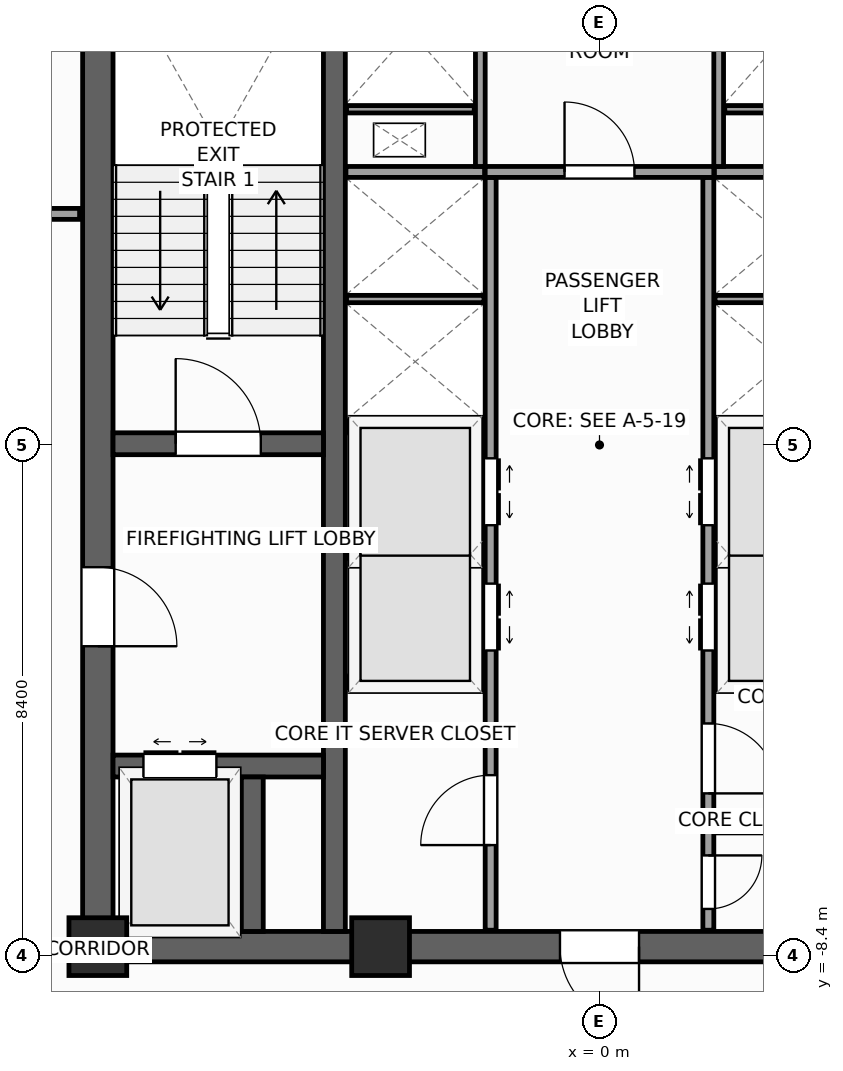
"""IFC4 building model, lengths in metres.
Left out: names, types, materials, properties, quantities, classifications, styles, units other than length and angle.
Written with IfcOpenShell. Run it as: python <this file> out.ifc"""

import sys

from ifc_helpers import new_model, si_unit, direction, frame, frame_2d, origin, origin_2d, place, context, subcontext, project, spatial, rectangle, extrude, source, transform, mapped, element, fill, save


model = new_model("IFC4")
c1 = context("Model", 3, precision=1e-05, world=origin(), true_north=direction((0.0, 1.0)))
c2 = subcontext(c1, "Body", "Model", "MODEL_VIEW")
j1 = project(units=[si_unit("LENGTHUNIT", "METRE"), si_unit("PLANEANGLEUNIT", "RADIAN")], contexts=[c1])
p1 = place(None, origin())
s1 = spatial("IfcSite", under=j1, at=p1, CompositionType="ELEMENT")
p2 = place(p1, origin())
s2 = spatial("IfcBuilding", under=s1, at=p2, CompositionType="ELEMENT")
p3 = place(p2, frame((0.0, 0.0, 217.3)))
s3 = spatial("IfcBuildingStorey", under=s2, at=p3, CompositionType="ELEMENT", Elevation=217.3)
p4 = place(p3, frame((-8.5, -8.25, 0.0), z_axis=(0.0, 0.0, 1.0), x_axis=(1.0, 0.0, 0.0)))
e1 = element("IfcWall", 1, at=p4, inside=s3, PredefinedType="SHEAR", context=c2, shape_type="SweptSolid", body=[
    extrude(rectangle(XDim=17.0, YDim=0.5, at=frame_2d((8.5, 0.0))), origin(), (0.0, 0.0, 1.0), 3.9),
])
p5 = place(p4, frame((7.85, 0.0, 0.0)))
e2 = element("IfcOpeningElement", 2, at=p5, cuts=e1, PredefinedType="OPENING", context=c2, shape_type="SweptSolid", body=[
    extrude(rectangle(XDim=1.3, YDim=2.2, at=frame_2d((0.65, 1.1))), frame((0.0, 0.26, 0.0), z_axis=(0.0, -1.0, 0.0), x_axis=(1.0, 0.0, 0.0)), (0.0, 0.0, 1.0), 0.52),
])
p6 = place(p3, frame((-8.25, -8.0, 0.0), z_axis=(0.0, 0.0, 1.0), x_axis=(0.0, 1.0, 0.0)))
e3 = element("IfcWall", 3, at=p6, inside=s3, PredefinedType="SHEAR", context=c2, shape_type="SweptSolid", body=[
    extrude(rectangle(XDim=16.0, YDim=0.5, at=frame_2d((8.0, 0.0))), origin(), (0.0, 0.0, 1.0), 3.9),
])
p7 = place(p6, frame((4.69, 0.0, 0.0)))
e4 = element("IfcOpeningElement", 4, at=p7, cuts=e3, PredefinedType="OPENING", context=c2, shape_type="SweptSolid", body=[
    extrude(rectangle(XDim=1.3, YDim=2.2, at=frame_2d((0.65, 1.1))), frame((0.0, 0.26, 0.0), z_axis=(0.0, -1.0, 0.0), x_axis=(1.0, 0.0, 0.0)), (0.0, 0.0, 1.0), 0.52),
])
p8 = place(p3, frame((-4.36, -8.0, 0.0), z_axis=(0.0, 0.0, 1.0), x_axis=(0.0, 1.0, 0.0)))
e5 = element("IfcWall", 5, at=p8, inside=s3, PredefinedType="SHEAR", context=c2, shape_type="SweptSolid", body=[
    extrude(rectangle(XDim=16.0, YDim=0.36, at=frame_2d((8.0, 0.0))), origin(), (0.0, 0.0, 1.0), 3.9),
])
p9 = place(p3, frame((-8.0, 0.02, 0.0), z_axis=(0.0, 0.0, 1.0), x_axis=(1.0, 0.0, 0.0)))
e6 = element("IfcWall", 6, at=p9, inside=s3, PredefinedType="SHEAR", context=c2, shape_type="SweptSolid", body=[
    extrude(rectangle(XDim=3.46, YDim=0.36, at=frame_2d((1.73, 0.0))), origin(), (0.0, 0.0, 1.0), 3.9),
])
p10 = place(p9, frame((1.03, 0.0, 0.0)))
e7 = element("IfcOpeningElement", 7, at=p10, cuts=e6, PredefinedType="OPENING", context=c2, shape_type="SweptSolid", body=[
    extrude(rectangle(XDim=1.4, YDim=2.2, at=frame_2d((0.7, 1.1))), frame((0.0, 0.19, 0.0), z_axis=(0.0, -1.0, 0.0), x_axis=(1.0, 0.0, 0.0)), (0.0, 0.0, 1.0), 0.38),
])
p11 = place(p3, frame((-8.0, -5.28, 0.0), z_axis=(0.0, 0.0, 1.0), x_axis=(1.0, 0.0, 0.0)))
e8 = element("IfcWall", 8, at=p11, inside=s3, PredefinedType="SHEAR", context=c2, shape_type="SweptSolid", body=[
    extrude(rectangle(XDim=3.46, YDim=0.36, at=frame_2d((1.73, 0.0))), origin(), (0.0, 0.0, 1.0), 3.9),
])
p12 = place(p11, frame((0.5, 0.0, 0.0)))
e9 = element("IfcOpeningElement", 9, at=p12, cuts=e8, PredefinedType="OPENING", context=c2, shape_type="SweptSolid", body=[
    extrude(rectangle(XDim=1.2, YDim=2.25, at=frame_2d((0.6, 1.125))), frame((0.0, 0.19, 0.0), z_axis=(0.0, -1.0, 0.0), x_axis=(1.0, 0.0, 0.0)), (0.0, 0.0, 1.0), 0.38),
])
p13 = place(p3, frame((-5.71, -8.0, 0.0), z_axis=(0.0, 0.0, 1.0), x_axis=(0.0, 1.0, 0.0)))
e10 = element("IfcWall", 10, at=p13, inside=s3, PredefinedType="SHEAR", context=c2, shape_type="SweptSolid", body=[
    extrude(rectangle(XDim=2.54, YDim=0.36, at=frame_2d((1.27, 0.0))), origin(), (0.0, 0.0, 1.0), 3.9),
])
m1 = source(origin(), c2, "Body", "SweptSolid", [
    extrude(rectangle(XDim=0.95, YDim=0.95, at=origin_2d()), origin(), (0.0, 0.0, 1.0), 3.9),
])
for number, where, z_axis, x_axis in (
    (11, (-8.25, -8.25, 0.0), (0.0, 0.0, 1.0), (1.0, 0.0, 0.0)),
    (12, (-3.6, -8.25, 0.0), (0.0, 0.0, 1.0), (1.0, 0.0, 0.0)),
):
    element("IfcColumn", number, at=place(p3, frame(where, z_axis=z_axis, x_axis=x_axis)), inside=s3, PredefinedType="PILASTER", context=c2, shape_type="MappedRepresentation", body=[
        mapped(m1, transform((0.0, 0.0, 0.0), scale=1.0)),
    ])
p14 = place(p3, frame((-6.733, 29.154, 0.0), z_axis=(0.0, 0.0, 1.0), x_axis=(-0.629325378072, -0.77714192302, 0.0)))
e13 = element("IfcWall", 13, at=p14, inside=s3, PredefinedType="STANDARD", context=c2, shape_type="SweptSolid", body=[
    extrude(rectangle(XDim=36.84, YDim=0.34, at=frame_2d((18.42, 0.0))), origin(), (0.0, 0.0, 1.0), 2.96),
])
p15 = place(p14, frame((3.721, 0.0, 0.48)))
e14 = element("IfcOpeningElement", 14, at=p15, cuts=e13, PredefinedType="OPENING", context=c2, shape_type="SweptSolid", body=[
    extrude(rectangle(XDim=1.4, YDim=2.4, at=frame_2d((0.7, 1.2))), frame((0.0, 0.18, 0.0), z_axis=(0.0, -1.0, 0.0), x_axis=(1.0, 0.0, 0.0)), (0.0, 0.0, 1.0), 0.36),
])
p16 = place(p14, frame((9.809, 0.0, 0.58)))
e15 = element("IfcOpeningElement", 15, at=p16, cuts=e13, PredefinedType="OPENING", context=c2, shape_type="SweptSolid", body=[
    extrude(rectangle(XDim=1.75, YDim=2.3, at=frame_2d((0.875, 1.15))), frame((0.0, 0.18, 0.0), z_axis=(0.0, -1.0, 0.0), x_axis=(1.0, 0.0, 0.0)), (0.0, 0.0, 1.0), 0.36),
])
p17 = place(p14, frame((16.058, 0.0, 0.58)))
e16 = element("IfcOpeningElement", 16, at=p17, cuts=e13, PredefinedType="OPENING", context=c2, shape_type="SweptSolid", body=[
    extrude(rectangle(XDim=1.75, YDim=2.3, at=frame_2d((0.875, 1.15))), frame((0.0, 0.18, 0.0), z_axis=(0.0, -1.0, 0.0), x_axis=(1.0, 0.0, 0.0)), (0.0, 0.0, 1.0), 0.36),
])
p18 = place(p14, frame((24.176, 0.0, 0.58)))
e17 = element("IfcOpeningElement", 17, at=p18, cuts=e13, PredefinedType="OPENING", context=c2, shape_type="SweptSolid", body=[
    extrude(rectangle(XDim=1.75, YDim=2.3, at=frame_2d((0.875, 1.15))), frame((0.0, 0.18, 0.0), z_axis=(0.0, -1.0, 0.0), x_axis=(1.0, 0.0, 0.0)), (0.0, 0.0, 1.0), 0.36),
])
p19 = place(p14, frame((30.232, 0.0, 0.48)))
e18 = element("IfcOpeningElement", 18, at=p19, cuts=e13, PredefinedType="OPENING", context=c2, shape_type="SweptSolid", body=[
    extrude(rectangle(XDim=1.4, YDim=2.4, at=frame_2d((0.7, 1.2))), frame((0.0, 0.18, 0.0), z_axis=(0.0, -1.0, 0.0), x_axis=(1.0, 0.0, 0.0)), (0.0, 0.0, 1.0), 0.36),
])
p20 = place(p3, frame((-29.154, -6.733, 0.0), z_axis=(0.0, 0.0, 1.0), x_axis=(0.77714192302, -0.629325378072, 0.0)))
e19 = element("IfcWall", 19, at=p20, inside=s3, PredefinedType="STANDARD", context=c2, shape_type="SweptSolid", body=[
    extrude(rectangle(XDim=36.84, YDim=0.34, at=frame_2d((18.42, 0.0))), origin(), (0.0, 0.0, 1.0), 2.96),
])
p21 = place(p20, frame((23.495, 0.0, 0.0)))
e20 = element("IfcOpeningElement", 20, at=p21, cuts=e19, PredefinedType="OPENING", context=c2, shape_type="SweptSolid", body=[
    extrude(rectangle(XDim=1.05, YDim=2.25, at=frame_2d((0.525, 1.125))), frame((0.0, 0.18, 0.0), z_axis=(0.0, -1.0, 0.0), x_axis=(1.0, 0.0, 0.0)), (0.0, 0.0, 1.0), 0.36),
])
p22 = place(p20, frame((3.721, 0.0, 0.48)))
e21 = element("IfcOpeningElement", 21, at=p22, cuts=e19, PredefinedType="OPENING", context=c2, shape_type="SweptSolid", body=[
    extrude(rectangle(XDim=1.4, YDim=2.4, at=frame_2d((0.7, 1.2))), frame((0.0, 0.18, 0.0), z_axis=(0.0, -1.0, 0.0), x_axis=(1.0, 0.0, 0.0)), (0.0, 0.0, 1.0), 0.36),
])
p23 = place(p20, frame((9.809, 0.0, 0.58)))
e22 = element("IfcOpeningElement", 22, at=p23, cuts=e19, PredefinedType="OPENING", context=c2, shape_type="SweptSolid", body=[
    extrude(rectangle(XDim=1.75, YDim=2.3, at=frame_2d((0.875, 1.15))), frame((0.0, 0.18, 0.0), z_axis=(0.0, -1.0, 0.0), x_axis=(1.0, 0.0, 0.0)), (0.0, 0.0, 1.0), 0.36),
])
p24 = place(p20, frame((16.058, 0.0, 0.58)))
e23 = element("IfcOpeningElement", 23, at=p24, cuts=e19, PredefinedType="OPENING", context=c2, shape_type="SweptSolid", body=[
    extrude(rectangle(XDim=1.75, YDim=2.3, at=frame_2d((0.875, 1.15))), frame((0.0, 0.18, 0.0), z_axis=(0.0, -1.0, 0.0), x_axis=(1.0, 0.0, 0.0)), (0.0, 0.0, 1.0), 0.36),
])
p25 = place(p20, frame((25.676, 0.0, 0.58)))
e24 = element("IfcOpeningElement", 24, at=p25, cuts=e19, PredefinedType="OPENING", context=c2, shape_type="SweptSolid", body=[
    extrude(rectangle(XDim=1.75, YDim=2.3, at=frame_2d((0.875, 1.15))), frame((0.0, 0.18, 0.0), z_axis=(0.0, -1.0, 0.0), x_axis=(1.0, 0.0, 0.0)), (0.0, 0.0, 1.0), 0.36),
])
p26 = place(p20, frame((30.232, 0.0, 0.48)))
e25 = element("IfcOpeningElement", 25, at=p26, cuts=e19, PredefinedType="OPENING", context=c2, shape_type="SweptSolid", body=[
    extrude(rectangle(XDim=1.4, YDim=2.4, at=frame_2d((0.7, 1.2))), frame((0.0, 0.18, 0.0), z_axis=(0.0, -1.0, 0.0), x_axis=(1.0, 0.0, 0.0)), (0.0, 0.0, 1.0), 0.36),
])
p27 = place(p3, frame((-1.79, -7.98, 0.0), z_axis=(0.0, 0.0, 1.0), x_axis=(0.0, 1.0, 0.0)))
e26 = element("IfcWall", 26, at=p27, inside=s3, PredefinedType="PARTITIONING", context=c2, shape_type="SweptSolid", body=[
    extrude(rectangle(XDim=12.38, YDim=0.18, at=frame_2d((6.19, 0.0))), origin(), (0.0, 0.0, 1.0), 3.66),
])
p28 = place(p27, frame((4.6, 0.0, 0.0)))
e27 = element("IfcOpeningElement", 27, at=p28, cuts=e26, PredefinedType="OPENING", context=c2, shape_type="SweptSolid", body=[
    extrude(rectangle(XDim=1.1, YDim=2.2, at=frame_2d((0.55, 1.1))), frame((0.0, 0.1, 0.0), z_axis=(0.0, -1.0, 0.0), x_axis=(1.0, 0.0, 0.0)), (0.0, 0.0, 1.0), 0.2),
])
p29 = place(p27, frame((6.66, 0.0, 0.0)))
e28 = element("IfcOpeningElement", 28, at=p29, cuts=e26, PredefinedType="OPENING", context=c2, shape_type="SweptSolid", body=[
    extrude(rectangle(XDim=1.1, YDim=2.2, at=frame_2d((0.55, 1.1))), frame((0.0, 0.1, 0.0), z_axis=(0.0, -1.0, 0.0), x_axis=(1.0, 0.0, 0.0)), (0.0, 0.0, 1.0), 0.2),
])
p30 = place(p27, frame((1.4, 0.0, 0.0)))
e29 = element("IfcOpeningElement", 29, at=p30, cuts=e26, PredefinedType="OPENING", context=c2, shape_type="SweptSolid", body=[
    extrude(rectangle(XDim=1.15, YDim=2.25, at=frame_2d((0.575, 1.125))), frame((0.0, 0.1, 0.0), z_axis=(0.0, -1.0, 0.0), x_axis=(1.0, 0.0, 0.0)), (0.0, 0.0, 1.0), 0.2),
])
p31 = place(p3, frame((1.79, -7.98, 0.0), z_axis=(0.0, 0.0, 1.0), x_axis=(0.0, 1.0, 0.0)))
e30 = element("IfcWall", 30, at=p31, inside=s3, PredefinedType="PARTITIONING", context=c2, shape_type="SweptSolid", body=[
    extrude(rectangle(XDim=12.38, YDim=0.18, at=frame_2d((6.19, 0.0))), origin(), (0.0, 0.0, 1.0), 3.66),
])
p32 = place(p31, frame((4.6, 0.0, 0.0)))
e31 = element("IfcOpeningElement", 31, at=p32, cuts=e30, PredefinedType="OPENING", context=c2, shape_type="SweptSolid", body=[
    extrude(rectangle(XDim=1.1, YDim=2.2, at=frame_2d((0.55, 1.1))), frame((0.0, 0.1, 0.0), z_axis=(0.0, -1.0, 0.0), x_axis=(1.0, 0.0, 0.0)), (0.0, 0.0, 1.0), 0.2),
])
p33 = place(p31, frame((6.66, 0.0, 0.0)))
e32 = element("IfcOpeningElement", 32, at=p33, cuts=e30, PredefinedType="OPENING", context=c2, shape_type="SweptSolid", body=[
    extrude(rectangle(XDim=1.1, YDim=2.2, at=frame_2d((0.55, 1.1))), frame((0.0, 0.1, 0.0), z_axis=(0.0, -1.0, 0.0), x_axis=(1.0, 0.0, 0.0)), (0.0, 0.0, 1.0), 0.2),
])
p34 = place(p31, frame((0.35, 0.0, 0.0)))
e33 = element("IfcOpeningElement", 33, at=p34, cuts=e30, PredefinedType="OPENING", context=c2, shape_type="SweptSolid", body=[
    extrude(rectangle(XDim=0.88, YDim=2.1, at=frame_2d((0.44, 1.05))), frame((0.0, 0.1, 0.0), z_axis=(0.0, -1.0, 0.0), x_axis=(1.0, 0.0, 0.0)), (0.0, 0.0, 1.0), 0.2),
])
p35 = place(p31, frame((2.25, 0.0, 0.0)))
e34 = element("IfcOpeningElement", 34, at=p35, cuts=e30, PredefinedType="OPENING", context=c2, shape_type="SweptSolid", body=[
    extrude(rectangle(XDim=1.15, YDim=2.25, at=frame_2d((0.575, 1.125))), frame((0.0, 0.1, 0.0), z_axis=(0.0, -1.0, 0.0), x_axis=(1.0, 0.0, 0.0)), (0.0, 0.0, 1.0), 0.2),
])
p36 = place(p3, frame((-1.88, 4.49, 0.0), z_axis=(0.0, 0.0, 1.0), x_axis=(1.0, 0.0, 0.0)))
e35 = element("IfcWall", 35, at=p36, inside=s3, PredefinedType="PARTITIONING", context=c2, shape_type="SweptSolid", body=[
    extrude(rectangle(XDim=3.76, YDim=0.18, at=frame_2d((1.88, 0.0))), origin(), (0.0, 0.0, 1.0), 3.66),
])
p37 = place(p36, frame((1.305, 0.0, 0.0)))
e36 = element("IfcOpeningElement", 36, at=p37, cuts=e35, PredefinedType="OPENING", context=c2, shape_type="SweptSolid", body=[
    extrude(rectangle(XDim=1.15, YDim=2.25, at=frame_2d((0.575, 1.125))), frame((0.0, 0.1, 0.0), z_axis=(0.0, -1.0, 0.0), x_axis=(1.0, 0.0, 0.0)), (0.0, 0.0, 1.0), 0.2),
])
for number, where, z_axis, x_axis in (
    (37, (-4.17, -3.9, 0.0), (0.0, 0.0, 1.0), (1.0, 0.0, 0.0)),
    (38, (1.89, -3.9, 0.0), (0.0, 0.0, 1.0), (1.0, 0.0, 0.0)),
    (39, (-4.17, 0.3, 0.0), (0.0, 0.0, 1.0), (1.0, 0.0, 0.0)),
    (40, (1.89, 0.3, 0.0), (0.0, 0.0, 1.0), (1.0, 0.0, 0.0)),
    (41, (-4.17, 4.49, 0.0), (0.0, 0.0, 1.0), (1.0, 0.0, 0.0)),
    (42, (1.89, 4.49, 0.0), (0.0, 0.0, 1.0), (1.0, 0.0, 0.0)),
):
    element("IfcWall", number, at=place(p3, frame(where, z_axis=z_axis, x_axis=x_axis)), inside=s3, PredefinedType="PARTITIONING", context=c2, shape_type="SweptSolid", body=[
        extrude(rectangle(XDim=2.28, YDim=0.18, at=frame_2d((1.14, 0.0))), origin(), (0.0, 0.0, 1.0), 3.66),
    ])
for number, where, z_axis, x_axis in (
    (43, (-4.16, -1.8, 0.0), (0.0, 0.0, 1.0), (1.0, 0.0, 0.0)),
    (44, (1.9, -1.8, 0.0), (0.0, 0.0, 1.0), (1.0, 0.0, 0.0)),
    (45, (-4.16, 2.4, 0.0), (0.0, 0.0, 1.0), (1.0, 0.0, 0.0)),
    (46, (1.9, 2.4, 0.0), (0.0, 0.0, 1.0), (1.0, 0.0, 0.0)),
):
    element("IfcWall", number, at=place(p3, frame(where, z_axis=z_axis, x_axis=x_axis)), inside=s3, PredefinedType="PARTITIONING", context=c2, shape_type="SweptSolid", body=[
        extrude(rectangle(XDim=2.26, YDim=0.12, at=frame_2d((1.13, 0.0))), origin(), (0.0, 0.0, 1.0), 3.66),
    ])
p38 = place(p3, frame((1.89, -6.3, 0.0), z_axis=(0.0, 0.0, 1.0), x_axis=(1.0, 0.0, 0.0)))
e47 = element("IfcWall", 47, at=p38, inside=s3, PredefinedType="PARTITIONING", context=c2, shape_type="SweptSolid", body=[
    extrude(rectangle(XDim=2.28, YDim=0.16, at=frame_2d((1.14, 0.0))), origin(), (0.0, 0.0, 1.0), 3.66),
])
for number, where, z_axis, x_axis in (
    (48, (-1.96, 4.58, 0.0), (0.0, 0.0, 1.0), (0.0, 1.0, 0.0)),
    (49, (1.96, 4.58, 0.0), (0.0, 0.0, 1.0), (0.0, 1.0, 0.0)),
):
    element("IfcWall", number, at=place(p3, frame(where, z_axis=z_axis, x_axis=x_axis)), inside=s3, PredefinedType="PARTITIONING", context=c2, shape_type="SweptSolid", body=[
        extrude(rectangle(XDim=3.4, YDim=0.16, at=frame_2d((1.7, 0.0))), origin(), (0.0, 0.0, 1.0), 3.66),
    ])
for number, where, z_axis, x_axis in (
    (50, (-4.16, 5.52, 0.0), (0.0, 0.0, 1.0), (1.0, 0.0, 0.0)),
    (51, (2.06, 5.52, 0.0), (0.0, 0.0, 1.0), (1.0, 0.0, 0.0)),
):
    element("IfcWall", number, at=place(p3, frame(where, z_axis=z_axis, x_axis=x_axis)), inside=s3, PredefinedType="PARTITIONING", context=c2, shape_type="SweptSolid", body=[
        extrude(rectangle(XDim=2.1, YDim=0.12, at=frame_2d((1.05, 0.0))), origin(), (0.0, 0.0, 1.0), 3.66),
    ])
p39 = place(p3, frame((-11.4, 3.8, 0.0), z_axis=(0.0, 0.0, 1.0), x_axis=(1.0, 0.0, 0.0)))
e52 = element("IfcWall", 52, at=p39, inside=s3, PredefinedType="PARTITIONING", context=c2, shape_type="SweptSolid", body=[
    extrude(rectangle(XDim=2.85, YDim=0.18, at=frame_2d((1.425, 0.0))), origin(), (0.0, 0.0, 1.0), 3.66),
])
p40 = place(p39, frame((0.875, 0.0, 0.0)))
e53 = element("IfcOpeningElement", 53, at=p40, cuts=e52, PredefinedType="OPENING", context=c2, shape_type="SweptSolid", body=[
    extrude(rectangle(XDim=1.1, YDim=2.2, at=frame_2d((0.55, 1.1))), frame((0.0, 0.1, 0.0), z_axis=(0.0, -1.0, 0.0), x_axis=(1.0, 0.0, 0.0)), (0.0, 0.0, 1.0), 0.2),
])
m2 = source(origin(), c2, "Body", "SweptSolid", [
    extrude(rectangle(XDim=1.4, YDim=2.2, at=frame_2d((0.7, 1.1))), frame((0.0, 0.025, 0.0), z_axis=(0.0, -1.0, 0.0), x_axis=(1.0, 0.0, 0.0)), (0.0, 0.0, 1.0), 0.05),
])
p41 = place(p10, origin())
e54 = element("IfcDoor", 54, at=p41, inside=s3, OperationType="SINGLE_SWING_LEFT", PredefinedType="DOOR", context=c2, shape_type="MappedRepresentation", body=[
    mapped(m2, transform((0.0, 0.0, 0.0), scale=1.0)),
])
fill(e7, e54)
m3 = source(origin(), c2, "Body", "SweptSolid", [
    extrude(rectangle(XDim=1.3, YDim=2.2, at=frame_2d((0.65, 1.1))), frame((0.0, 0.025, 0.0), z_axis=(0.0, -1.0, 0.0), x_axis=(1.0, 0.0, 0.0)), (0.0, 0.0, 1.0), 0.05),
])
p42 = place(p7, frame((1.3, 0.0, 0.0), z_axis=(0.0, 0.0, 1.0), x_axis=(-1.0, 0.0, 0.0)))
e55 = element("IfcDoor", 55, at=p42, inside=s3, OperationType="SINGLE_SWING_LEFT", PredefinedType="DOOR", context=c2, shape_type="MappedRepresentation", body=[
    mapped(m3, transform((0.0, 0.0, 0.0), scale=1.0)),
])
fill(e4, e55)
p43 = place(p5, frame((1.3, 0.0, 0.0), z_axis=(0.0, 0.0, 1.0), x_axis=(-1.0, 0.0, 0.0)))
e56 = element("IfcDoor", 56, at=p43, inside=s3, OperationType="SINGLE_SWING_RIGHT", PredefinedType="DOOR", context=c2, shape_type="MappedRepresentation", body=[
    mapped(m3, transform((0.0, 0.0, 0.0), scale=1.0)),
])
fill(e2, e56)
m4 = source(origin(), c2, "Body", "SweptSolid", [
    extrude(rectangle(XDim=1.2, YDim=2.25, at=frame_2d((0.6, 1.125))), frame((0.0, 0.025, 0.0), z_axis=(0.0, -1.0, 0.0), x_axis=(1.0, 0.0, 0.0)), (0.0, 0.0, 1.0), 0.05),
])
p44 = place(p12, origin())
e57 = element("IfcDoor", 57, at=p44, inside=s3, OperationType="DOUBLE_DOOR_SLIDING", PredefinedType="DOOR", context=c2, shape_type="MappedRepresentation", body=[
    mapped(m4, transform((0.0, 0.0, 0.0), scale=1.0)),
])
fill(e9, e57)
m5 = source(origin(), c2, "Body", "SweptSolid", [
    extrude(rectangle(XDim=1.1, YDim=2.2, at=frame_2d((0.55, 1.1))), frame((0.0, 0.025, 0.0), z_axis=(0.0, -1.0, 0.0), x_axis=(1.0, 0.0, 0.0)), (0.0, 0.0, 1.0), 0.05),
])
p45 = place(p28, frame((1.1, 0.0, 0.0), z_axis=(0.0, 0.0, 1.0), x_axis=(-1.0, 0.0, 0.0)))
e58 = element("IfcDoor", 58, at=p45, inside=s3, OperationType="DOUBLE_DOOR_SLIDING", PredefinedType="DOOR", context=c2, shape_type="MappedRepresentation", body=[
    mapped(m5, transform((0.0, 0.0, 0.0), scale=1.0)),
])
fill(e27, e58)
p46 = place(p29, frame((1.1, 0.0, 0.0), z_axis=(0.0, 0.0, 1.0), x_axis=(-1.0, 0.0, 0.0)))
e59 = element("IfcDoor", 59, at=p46, inside=s3, OperationType="DOUBLE_DOOR_SLIDING", PredefinedType="DOOR", context=c2, shape_type="MappedRepresentation", body=[
    mapped(m5, transform((0.0, 0.0, 0.0), scale=1.0)),
])
fill(e28, e59)
p47 = place(p32, origin())
e60 = element("IfcDoor", 60, at=p47, inside=s3, OperationType="DOUBLE_DOOR_SLIDING", PredefinedType="DOOR", context=c2, shape_type="MappedRepresentation", body=[
    mapped(m5, transform((0.0, 0.0, 0.0), scale=1.0)),
])
fill(e31, e60)
p48 = place(p33, origin())
e61 = element("IfcDoor", 61, at=p48, inside=s3, OperationType="DOUBLE_DOOR_SLIDING", PredefinedType="DOOR", context=c2, shape_type="MappedRepresentation", body=[
    mapped(m5, transform((0.0, 0.0, 0.0), scale=1.0)),
])
fill(e32, e61)
m6 = source(origin(), c2, "Body", "SweptSolid", [
    extrude(rectangle(XDim=1.15, YDim=2.25, at=frame_2d((0.575, 1.125))), frame((0.0, 0.025, 0.0), z_axis=(0.0, -1.0, 0.0), x_axis=(1.0, 0.0, 0.0)), (0.0, 0.0, 1.0), 0.05),
])
p49 = place(p30, origin())
e62 = element("IfcDoor", 62, at=p49, inside=s3, OperationType="SINGLE_SWING_LEFT", PredefinedType="DOOR", context=c2, shape_type="MappedRepresentation", body=[
    mapped(m6, transform((0.0, 0.0, 0.0), scale=1.0)),
])
fill(e29, e62)
m7 = source(origin(), c2, "Body", "SweptSolid", [
    extrude(rectangle(XDim=0.88, YDim=2.1, at=frame_2d((0.44, 1.05))), frame((0.0, 0.025, 0.0), z_axis=(0.0, -1.0, 0.0), x_axis=(1.0, 0.0, 0.0)), (0.0, 0.0, 1.0), 0.05),
])
p50 = place(p34, frame((0.88, 0.0, 0.0), z_axis=(0.0, 0.0, 1.0), x_axis=(-1.0, 0.0, 0.0)))
e63 = element("IfcDoor", 63, at=p50, inside=s3, OperationType="SINGLE_SWING_RIGHT", PredefinedType="DOOR", context=c2, shape_type="MappedRepresentation", body=[
    mapped(m7, transform((0.0, 0.0, 0.0), scale=1.0)),
])
fill(e33, e63)
p51 = place(p35, frame((1.15, 0.0, 0.0), z_axis=(0.0, 0.0, 1.0), x_axis=(-1.0, 0.0, 0.0)))
e64 = element("IfcDoor", 64, at=p51, inside=s3, OperationType="SINGLE_SWING_LEFT", PredefinedType="DOOR", context=c2, shape_type="MappedRepresentation", body=[
    mapped(m6, transform((0.0, 0.0, 0.0), scale=1.0)),
])
fill(e34, e64)
p52 = place(p37, origin())
e65 = element("IfcDoor", 65, at=p52, inside=s3, OperationType="SINGLE_SWING_LEFT", PredefinedType="DOOR", context=c2, shape_type="MappedRepresentation", body=[
    mapped(m6, transform((0.0, 0.0, 0.0), scale=1.0)),
])
fill(e36, e65)
save(model, sys.argv[1])
